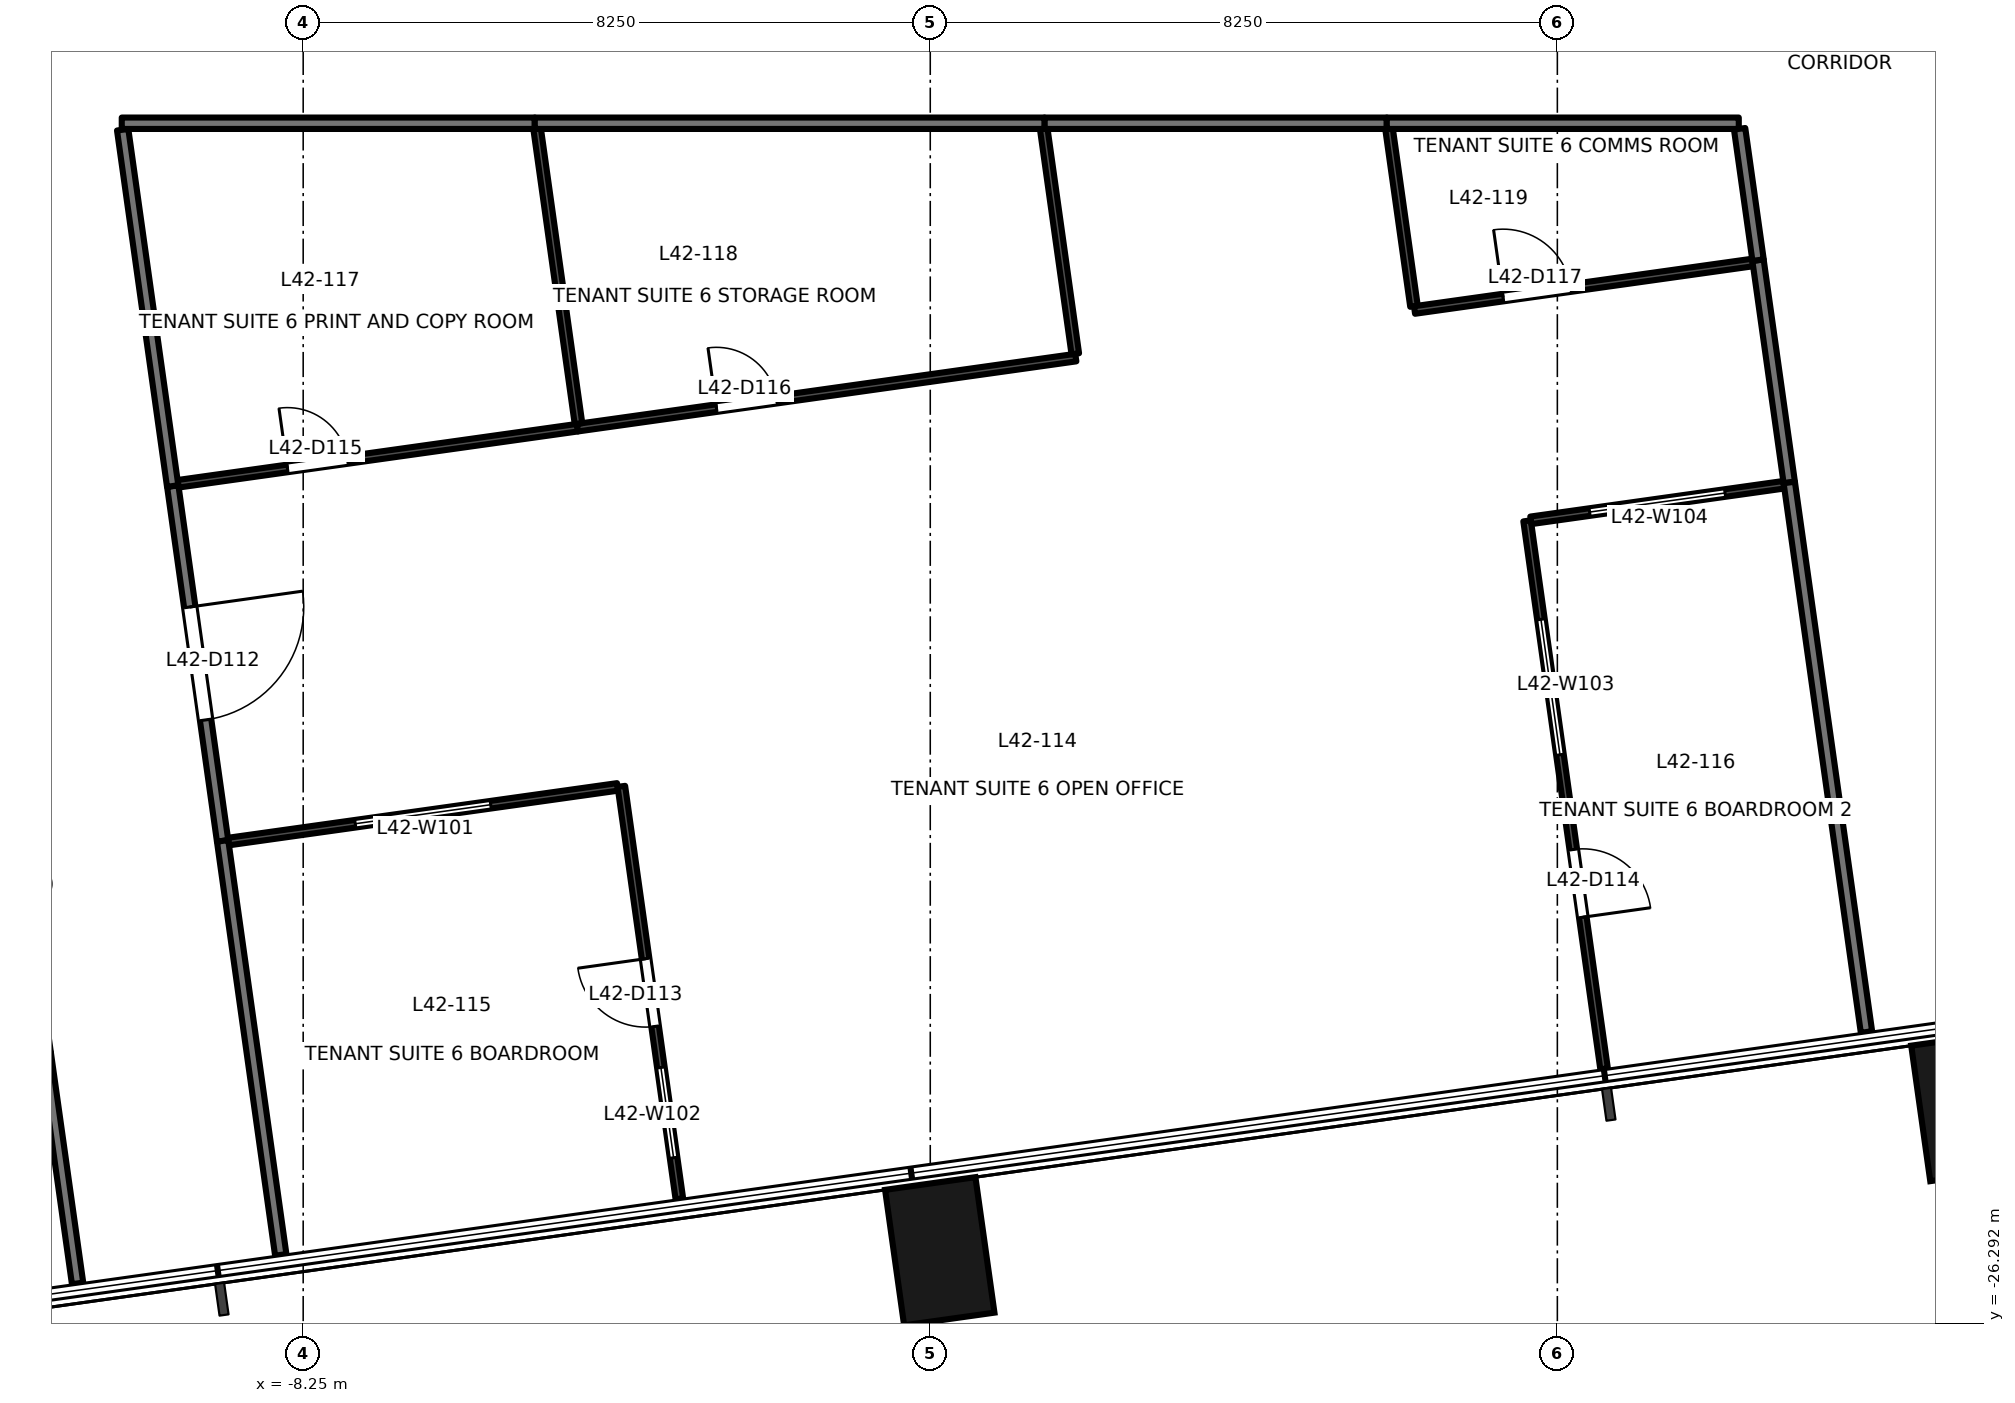
"""IFC4 building model, lengths in metres.
Left out: names, types, materials, properties, quantities, classifications, styles, units other than length and angle.
Written with IfcOpenShell. Run it as: python <this file> out.ifc"""

import sys

from ifc_helpers import new_model, si_unit, direction, frame, frame_2d, origin, origin_2d, place, context, subcontext, project, spatial, rectangle, extrude, element, fill, save


model = new_model("IFC4")
c1 = context("Model", 3, precision=1e-05, world=origin(), true_north=direction((0.0, 1.0)))
c2 = subcontext(c1, "Body", "Model", "MODEL_VIEW")
j1 = project(units=[si_unit("LENGTHUNIT", "METRE"), si_unit("PLANEANGLEUNIT", "RADIAN")], contexts=[c1])
p1 = place(None, origin())
s1 = spatial("IfcSite", under=j1, at=p1, CompositionType="ELEMENT")
p2 = place(p1, origin())
s2 = spatial("IfcBuilding", under=s1, at=p2, CompositionType="ELEMENT")
p3 = place(p2, frame((0.0, 0.0, 184.1)))
s3 = spatial("IfcBuildingStorey", under=s2, at=p3, CompositionType="ELEMENT", Elevation=184.1)
for number, where, z_axis, x_axis in (
    (1, (0.125, -25.34, -0.2), (0.0, 0.0, 1.0), (0.99, 0.139, 0.0)),
    (2, (13.625, -23.443, -0.2), (0.0, 0.0, 1.0), (0.99, 0.139, 0.0)),
):
    element("IfcColumn", number, at=place(p3, frame(where, z_axis=z_axis, x_axis=x_axis)), inside=s3, PredefinedType="COLUMN", context=c2, shape_type="SweptSolid", body=[
        extrude(rectangle(XDim=1.2, YDim=1.8, at=origin_2d()), origin(), (0.0, 0.0, 1.0), 3.9),
    ])
p4 = place(p3, frame((-11.218, -25.763, 0.0), z_axis=(0.0, 0.0, 1.0), x_axis=(-0.139187613425, 0.990266029039, 0.0)))
e3 = element("IfcWall", 3, at=p4, inside=s3, PredefinedType="PARTITIONING", context=c2, shape_type="SweptSolid", body=[
    extrude(rectangle(XDim=3.061, YDim=0.15, at=frame_2d((1.53, 0.0))), origin(), (0.0, 0.0, 1.0), 3.7),
])
p5 = place(p3, frame((-9.966, -15.273, 0.0), z_axis=(0.0, 0.0, 1.0), x_axis=(0.139137407344, -0.990273084496, 0.0)))
e4 = element("IfcWall", 4, at=p5, inside=s3, PredefinedType="PARTITIONING", context=c2, shape_type="SweptSolid", body=[
    extrude(rectangle(XDim=4.715, YDim=0.15, at=frame_2d((2.357, 0.0))), origin(), (0.0, 0.0, 1.0), 3.7),
])
p6 = place(p5, frame((1.607, 0.0, 0.0)))
e5 = element("IfcOpeningElement", 5, at=p6, cuts=e4, PredefinedType="OPENING", context=c2, shape_type="SweptSolid", body=[
    extrude(rectangle(XDim=1.5, YDim=2.1, at=frame_2d((0.75, 1.05))), frame((0.0, 0.085, 0.0), z_axis=(0.0, -1.0, 0.0), x_axis=(1.0, 0.0, 0.0)), (0.0, 0.0, 1.0), 0.171),
])
p7 = place(p3, frame((6.006, -10.5, 0.0), z_axis=(0.0, 0.0, 1.0), x_axis=(-1.0, 0.0, 0.0)))
e6 = element("IfcWall", 6, at=p7, inside=s3, PredefinedType="PARTITIONING", context=c2, shape_type="SweptSolid", body=[
    extrude(rectangle(XDim=4.504, YDim=0.15, at=frame_2d((2.252, 0.0))), origin(), (0.0, 0.0, 1.0), 2.9),
])
p8 = place(p3, frame((11.301, -15.226, 0.0), z_axis=(0.0, 0.0, 1.0), x_axis=(-0.139233295347, 0.990259607107, 0.0)))
e7 = element("IfcWall", 7, at=p8, inside=s3, PredefinedType="PARTITIONING", context=c2, shape_type="SweptSolid", body=[
    extrude(rectangle(XDim=2.953, YDim=0.15, at=frame_2d((1.477, 0.0))), origin(), (0.0, 0.0, 1.0), 3.7),
])
p9 = place(p3, frame((-9.31, -19.941, 0.0), z_axis=(0.0, 0.0, 1.0), x_axis=(0.139103174181, -0.990277893792, 0.0)))
e8 = element("IfcWall", 8, at=p9, inside=s3, PredefinedType="PARTITIONING", context=c2, shape_type="SweptSolid", body=[
    extrude(rectangle(XDim=5.5, YDim=0.15, at=frame_2d((2.75, 0.0))), origin(), (0.0, 0.0, 1.0), 2.8),
])
p10 = place(p3, frame((12.317, -22.456, 0.0), z_axis=(0.0, 0.0, 1.0), x_axis=(-0.139141087095, 0.990272567469, 0.0)))
e9 = element("IfcWall", 9, at=p10, inside=s3, PredefinedType="PARTITIONING", context=c2, shape_type="SweptSolid", body=[
    extrude(rectangle(XDim=7.301, YDim=0.15, at=frame_2d((3.65, 0.0))), origin(), (0.0, 0.0, 1.0), 3.7),
])
p11 = place(p3, frame((-10.625, -10.585, 0.0), z_axis=(0.0, 0.0, 1.0), x_axis=(0.138987741071, -0.990294101685, 0.0)))
e10 = element("IfcWall", 10, at=p11, inside=s3, PredefinedType="PARTITIONING", context=c2, shape_type="SweptSolid", body=[
    extrude(rectangle(XDim=4.734, YDim=0.15, at=frame_2d((2.367, 0.0))), origin(), (0.0, 0.0, 1.0), 3.7),
])
p12 = place(p3, frame((-5.203, -10.5, 0.0), z_axis=(0.0, 0.0, 1.0), x_axis=(-1.0, 0.0, 0.0)))
e11 = element("IfcWall", 11, at=p12, inside=s3, PredefinedType="PARTITIONING", context=c2, shape_type="SweptSolid", body=[
    extrude(rectangle(XDim=5.434, YDim=0.15, at=frame_2d((2.717, 0.0))), origin(), (0.0, 0.0, 1.0), 2.8),
])
p13 = place(p3, frame((1.502, -10.5, 0.0), z_axis=(0.0, 0.0, 1.0), x_axis=(-1.0, 0.0, 0.0)))
e12 = element("IfcWall", 12, at=p13, inside=s3, PredefinedType="PARTITIONING", context=c2, shape_type="SweptSolid", body=[
    extrude(rectangle(XDim=6.705, YDim=0.15, at=frame_2d((3.353, 0.0))), origin(), (0.0, 0.0, 1.0), 2.9),
])
p14 = place(p3, frame((10.637, -10.5, 0.0), z_axis=(0.0, 0.0, 1.0), x_axis=(-1.0, 0.0, 0.0)))
e13 = element("IfcWall", 13, at=p14, inside=s3, PredefinedType="PARTITIONING", context=c2, shape_type="SweptSolid", body=[
    extrude(rectangle(XDim=4.631, YDim=0.15, at=frame_2d((2.315, 0.0))), origin(), (0.0, 0.0, 1.0), 3.0),
])
p15 = place(p3, frame((10.891, -12.301, 0.0), z_axis=(0.0, 0.0, 1.0), x_axis=(-0.139344862723, 0.990243914009, 0.0)))
e14 = element("IfcWall", 14, at=p15, inside=s3, PredefinedType="PARTITIONING", context=c2, shape_type="SweptSolid", body=[
    extrude(rectangle(XDim=1.745, YDim=0.15, at=frame_2d((0.873, 0.0))), origin(), (0.0, 0.0, 1.0), 3.7),
])
p16 = place(p3, frame((-4.114, -19.231, 0.0), z_axis=(0.0, 0.0, 1.0), x_axis=(-0.990279259335, -0.139093452508, 0.0)))
e15 = element("IfcWall", 15, at=p16, inside=s3, PredefinedType="PARTITIONING", context=c2, shape_type="SweptSolid", body=[
    extrude(rectangle(XDim=5.169, YDim=0.1, at=frame_2d((2.584, 0.0))), origin(), (0.0, 0.0, 1.0), 2.8),
])
p17 = place(p16, frame((1.685, 0.0, 0.9)))
e16 = element("IfcOpeningElement", 16, at=p17, cuts=e15, PredefinedType="OPENING", context=c2, shape_type="SweptSolid", body=[
    extrude(rectangle(XDim=1.8, YDim=1.2, at=frame_2d((0.9, 0.6))), frame((0.0, 0.061, 0.0), z_axis=(0.0, -1.0, 0.0), x_axis=(1.0, 0.0, 0.0)), (0.0, 0.0, 1.0), 0.121),
])
p18 = place(p3, frame((-3.301, -24.65, 0.0), z_axis=(0.0, 0.0, 1.0), x_axis=(-0.139243907894, 0.990258114894, 0.0)))
e17 = element("IfcWall", 17, at=p18, inside=s3, PredefinedType="PARTITIONING", context=c2, shape_type="SweptSolid", body=[
    extrude(rectangle(XDim=5.479, YDim=0.1, at=frame_2d((2.74, 0.0))), origin(), (0.0, 0.0, 1.0), 3.7),
])
p19 = place(p18, frame((2.29, 0.0, 0.0)))
e18 = element("IfcOpeningElement", 18, at=p19, cuts=e17, PredefinedType="OPENING", context=c2, shape_type="SweptSolid", body=[
    extrude(rectangle(XDim=0.9, YDim=2.1, at=frame_2d((0.45, 1.05))), frame((0.0, 0.061, 0.0), z_axis=(0.0, -1.0, 0.0), x_axis=(1.0, 0.0, 0.0)), (0.0, 0.0, 1.0), 0.121),
])
p20 = place(p18, frame((0.545, 0.0, 0.9)))
e19 = element("IfcOpeningElement", 19, at=p20, cuts=e17, PredefinedType="OPENING", context=c2, shape_type="SweptSolid", body=[
    extrude(rectangle(XDim=1.2, YDim=1.2, at=frame_2d((0.6, 0.6))), frame((0.0, 0.061, 0.0), z_axis=(0.0, -1.0, 0.0), x_axis=(1.0, 0.0, 0.0)), (0.0, 0.0, 1.0), 0.121),
])
p21 = place(p3, frame((7.852, -15.731, 0.0), z_axis=(0.0, 0.0, 1.0), x_axis=(0.139143839005, -0.9902721808, 0.0)))
e20 = element("IfcWall", 20, at=p21, inside=s3, PredefinedType="PARTITIONING", context=c2, shape_type="SweptSolid", body=[
    extrude(rectangle(XDim=7.28, YDim=0.1, at=frame_2d((3.64, 0.0))), origin(), (0.0, 0.0, 1.0), 3.0),
])
p22 = place(p21, frame((4.366, 0.0, 0.0)))
e21 = element("IfcOpeningElement", 21, at=p22, cuts=e20, PredefinedType="OPENING", context=c2, shape_type="SweptSolid", body=[
    extrude(rectangle(XDim=0.9, YDim=2.1, at=frame_2d((0.45, 1.05))), frame((0.0, 0.061, 0.0), z_axis=(0.0, -1.0, 0.0), x_axis=(1.0, 0.0, 0.0)), (0.0, 0.0, 1.0), 0.121),
])
p23 = place(p21, frame((1.308, 0.0, 0.9)))
e22 = element("IfcOpeningElement", 22, at=p23, cuts=e20, PredefinedType="OPENING", context=c2, shape_type="SweptSolid", body=[
    extrude(rectangle(XDim=1.8, YDim=1.2, at=frame_2d((0.9, 0.6))), frame((0.0, 0.061, 0.0), z_axis=(0.0, -1.0, 0.0), x_axis=(1.0, 0.0, 0.0)), (0.0, 0.0, 1.0), 0.121),
])
p24 = place(p3, frame((11.229, -15.256, 0.0), z_axis=(0.0, 0.0, 1.0), x_axis=(-0.990256578838, -0.139254831399, 0.0)))
e23 = element("IfcWall", 23, at=p24, inside=s3, PredefinedType="PARTITIONING", context=c2, shape_type="SweptSolid", body=[
    extrude(rectangle(XDim=3.361, YDim=0.1, at=frame_2d((1.68, 0.0))), origin(), (0.0, 0.0, 1.0), 3.0),
])
p25 = place(p24, frame((0.78, 0.0, 0.9)))
e24 = element("IfcOpeningElement", 24, at=p25, cuts=e23, PredefinedType="OPENING", context=c2, shape_type="SweptSolid", body=[
    extrude(rectangle(XDim=1.8, YDim=1.2, at=frame_2d((0.9, 0.6))), frame((0.0, 0.061, 0.0), z_axis=(0.0, -1.0, 0.0), x_axis=(1.0, 0.0, 0.0)), (0.0, 0.0, 1.0), 0.121),
])
p26 = place(p3, frame((-9.895, -15.243, 0.0), z_axis=(0.0, 0.0, 1.0), x_axis=(0.99027719117, 0.139108176064, 0.0)))
e25 = element("IfcWall", 25, at=p26, inside=s3, PredefinedType="PARTITIONING", context=c2, shape_type="SweptSolid", body=[
    extrude(rectangle(XDim=5.305, YDim=0.1, at=frame_2d((2.653, 0.0))), origin(), (0.0, 0.0, 1.0), 2.8),
])
p27 = place(p26, frame((1.452, 0.0, 0.0)))
e26 = element("IfcOpeningElement", 26, at=p27, cuts=e25, PredefinedType="OPENING", context=c2, shape_type="SweptSolid", body=[
    extrude(rectangle(XDim=0.8, YDim=2.1, at=frame_2d((0.4, 1.05))), frame((0.0, 0.061, 0.0), z_axis=(0.0, -1.0, 0.0), x_axis=(1.0, 0.0, 0.0)), (0.0, 0.0, 1.0), 0.121),
])
p28 = place(p3, frame((-4.641, -14.505, 0.0), z_axis=(0.0, 0.0, 1.0), x_axis=(0.990258326755, 0.1392424012, 0.0)))
e27 = element("IfcWall", 27, at=p28, inside=s3, PredefinedType="PARTITIONING", context=c2, shape_type="SweptSolid", body=[
    extrude(rectangle(XDim=6.621, YDim=0.1, at=frame_2d((3.31, 0.0))), origin(), (0.0, 0.0, 1.0), 2.9),
])
p29 = place(p28, frame((1.846, 0.0, 0.0)))
e28 = element("IfcOpeningElement", 28, at=p29, cuts=e27, PredefinedType="OPENING", context=c2, shape_type="SweptSolid", body=[
    extrude(rectangle(XDim=0.8, YDim=2.1, at=frame_2d((0.4, 1.05))), frame((0.0, 0.061, 0.0), z_axis=(0.0, -1.0, 0.0), x_axis=(1.0, 0.0, 0.0)), (0.0, 0.0, 1.0), 0.121),
])
p30 = place(p3, frame((1.908, -13.533, 0.0), z_axis=(0.0, 0.0, 1.0), x_axis=(-0.138954956276, 0.990298702476, 0.0)))
e29 = element("IfcWall", 29, at=p30, inside=s3, PredefinedType="PARTITIONING", context=c2, shape_type="SweptSolid", body=[
    extrude(rectangle(XDim=2.994, YDim=0.1, at=frame_2d((1.497, 0.0))), origin(), (0.0, 0.0, 1.0), 3.7),
])
p31 = place(p3, frame((6.035, -10.568, 0.0), z_axis=(0.0, 0.0, 1.0), x_axis=(0.139280161334, -0.990253016486, 0.0)))
e30 = element("IfcWall", 30, at=p31, inside=s3, PredefinedType="PARTITIONING", context=c2, shape_type="SweptSolid", body=[
    extrude(rectangle(XDim=2.363, YDim=0.1, at=frame_2d((1.181, 0.0))), origin(), (0.0, 0.0, 1.0), 3.7),
])
p32 = place(p3, frame((6.371, -12.957, 0.0), z_axis=(0.0, 0.0, 1.0), x_axis=(0.990271914732, 0.139145732571, 0.0)))
e31 = element("IfcWall", 31, at=p32, inside=s3, PredefinedType="PARTITIONING", context=c2, shape_type="SweptSolid", body=[
    extrude(rectangle(XDim=4.492, YDim=0.1, at=frame_2d((2.246, 0.0))), origin(), (0.0, 0.0, 1.0), 3.0),
])
p33 = place(p32, frame((1.177, 0.0, 0.0)))
e32 = element("IfcOpeningElement", 32, at=p33, cuts=e31, PredefinedType="OPENING", context=c2, shape_type="SweptSolid", body=[
    extrude(rectangle(XDim=0.9, YDim=2.1, at=frame_2d((0.45, 1.05))), frame((0.0, 0.061, 0.0), z_axis=(0.0, -1.0, 0.0), x_axis=(1.0, 0.0, 0.0)), (0.0, 0.0, 1.0), 0.121),
])
p34 = place(p3, frame((-5.173, -10.568, 0.0), z_axis=(0.0, 0.0, 1.0), x_axis=(0.139006835826, -0.990291421549, 0.0)))
e33 = element("IfcWall", 33, at=p34, inside=s3, PredefinedType="PARTITIONING", context=c2, shape_type="SweptSolid", body=[
    extrude(rectangle(XDim=3.922, YDim=0.1, at=frame_2d((1.961, 0.0))), origin(), (0.0, 0.0, 1.0), 2.9),
])
p35 = place(p6, origin())
e34 = element("IfcDoor", 34, at=p35, inside=s3, OperationType="DOUBLE_DOOR_SINGLE_SWING", PredefinedType="DOOR", context=c2, shape_type="SweptSolid", body=[
    extrude(rectangle(XDim=1.5, YDim=2.1, at=frame_2d((0.75, 1.05))), frame((0.0, 0.025, 0.0), z_axis=(0.0, -1.0, 0.0), x_axis=(1.0, 0.0, 0.0)), (0.0, 0.0, 1.0), 0.05),
])
fill(e5, e34)
p36 = place(p19, origin())
e35 = element("IfcDoor", 35, at=p36, inside=s3, OperationType="SINGLE_SWING_RIGHT", PredefinedType="DOOR", context=c2, shape_type="SweptSolid", body=[
    extrude(rectangle(XDim=0.9, YDim=2.1, at=frame_2d((0.45, 1.05))), frame((0.0, 0.025, 0.0), z_axis=(0.0, -1.0, 0.0), x_axis=(1.0, 0.0, 0.0)), (0.0, 0.0, 1.0), 0.05),
])
fill(e18, e35)
p37 = place(p22, origin())
e36 = element("IfcDoor", 36, at=p37, inside=s3, OperationType="SINGLE_SWING_RIGHT", PredefinedType="DOOR", context=c2, shape_type="SweptSolid", body=[
    extrude(rectangle(XDim=0.9, YDim=2.1, at=frame_2d((0.45, 1.05))), frame((0.0, 0.025, 0.0), z_axis=(0.0, -1.0, 0.0), x_axis=(1.0, 0.0, 0.0)), (0.0, 0.0, 1.0), 0.05),
])
fill(e21, e36)
p38 = place(p27, origin())
e37 = element("IfcDoor", 37, at=p38, inside=s3, OperationType="SINGLE_SWING_LEFT", PredefinedType="DOOR", context=c2, shape_type="SweptSolid", body=[
    extrude(rectangle(XDim=0.8, YDim=2.1, at=frame_2d((0.4, 1.05))), frame((0.0, 0.025, 0.0), z_axis=(0.0, -1.0, 0.0), x_axis=(1.0, 0.0, 0.0)), (0.0, 0.0, 1.0), 0.05),
])
fill(e26, e37)
p39 = place(p29, origin())
e38 = element("IfcDoor", 38, at=p39, inside=s3, OperationType="SINGLE_SWING_LEFT", PredefinedType="DOOR", context=c2, shape_type="SweptSolid", body=[
    extrude(rectangle(XDim=0.8, YDim=2.1, at=frame_2d((0.4, 1.05))), frame((0.0, 0.025, 0.0), z_axis=(0.0, -1.0, 0.0), x_axis=(1.0, 0.0, 0.0)), (0.0, 0.0, 1.0), 0.05),
])
fill(e28, e38)
p40 = place(p33, origin())
e39 = element("IfcDoor", 39, at=p40, inside=s3, OperationType="SINGLE_SWING_LEFT", PredefinedType="DOOR", context=c2, shape_type="SweptSolid", body=[
    extrude(rectangle(XDim=0.9, YDim=2.1, at=frame_2d((0.45, 1.05))), frame((0.0, 0.025, 0.0), z_axis=(0.0, -1.0, 0.0), x_axis=(1.0, 0.0, 0.0)), (0.0, 0.0, 1.0), 0.05),
])
fill(e32, e39)
p41 = place(p17, origin())
e40 = element("IfcWindow", 40, at=p41, inside=s3, PartitioningType="SINGLE_PANEL", PredefinedType="WINDOW", context=c2, shape_type="SweptSolid", body=[
    extrude(rectangle(XDim=1.8, YDim=1.2, at=frame_2d((0.9, 0.6))), frame((0.0, 0.03, 0.0), z_axis=(0.0, -1.0, 0.0), x_axis=(1.0, 0.0, 0.0)), (0.0, 0.0, 1.0), 0.06),
])
fill(e16, e40)
p42 = place(p20, origin())
e41 = element("IfcWindow", 41, at=p42, inside=s3, PartitioningType="SINGLE_PANEL", PredefinedType="WINDOW", context=c2, shape_type="SweptSolid", body=[
    extrude(rectangle(XDim=1.2, YDim=1.2, at=frame_2d((0.6, 0.6))), frame((0.0, 0.03, 0.0), z_axis=(0.0, -1.0, 0.0), x_axis=(1.0, 0.0, 0.0)), (0.0, 0.0, 1.0), 0.06),
])
fill(e19, e41)
p43 = place(p23, origin())
e42 = element("IfcWindow", 42, at=p43, inside=s3, PartitioningType="SINGLE_PANEL", PredefinedType="WINDOW", context=c2, shape_type="SweptSolid", body=[
    extrude(rectangle(XDim=1.8, YDim=1.2, at=frame_2d((0.9, 0.6))), frame((0.0, 0.03, 0.0), z_axis=(0.0, -1.0, 0.0), x_axis=(1.0, 0.0, 0.0)), (0.0, 0.0, 1.0), 0.06),
])
fill(e22, e42)
p44 = place(p25, origin())
e43 = element("IfcWindow", 43, at=p44, inside=s3, PartitioningType="SINGLE_PANEL", PredefinedType="WINDOW", context=c2, shape_type="SweptSolid", body=[
    extrude(rectangle(XDim=1.8, YDim=1.2, at=frame_2d((0.9, 0.6))), frame((0.0, 0.03, 0.0), z_axis=(0.0, -1.0, 0.0), x_axis=(1.0, 0.0, 0.0)), (0.0, 0.0, 1.0), 0.06),
])
fill(e24, e43)
save(model, sys.argv[1])
